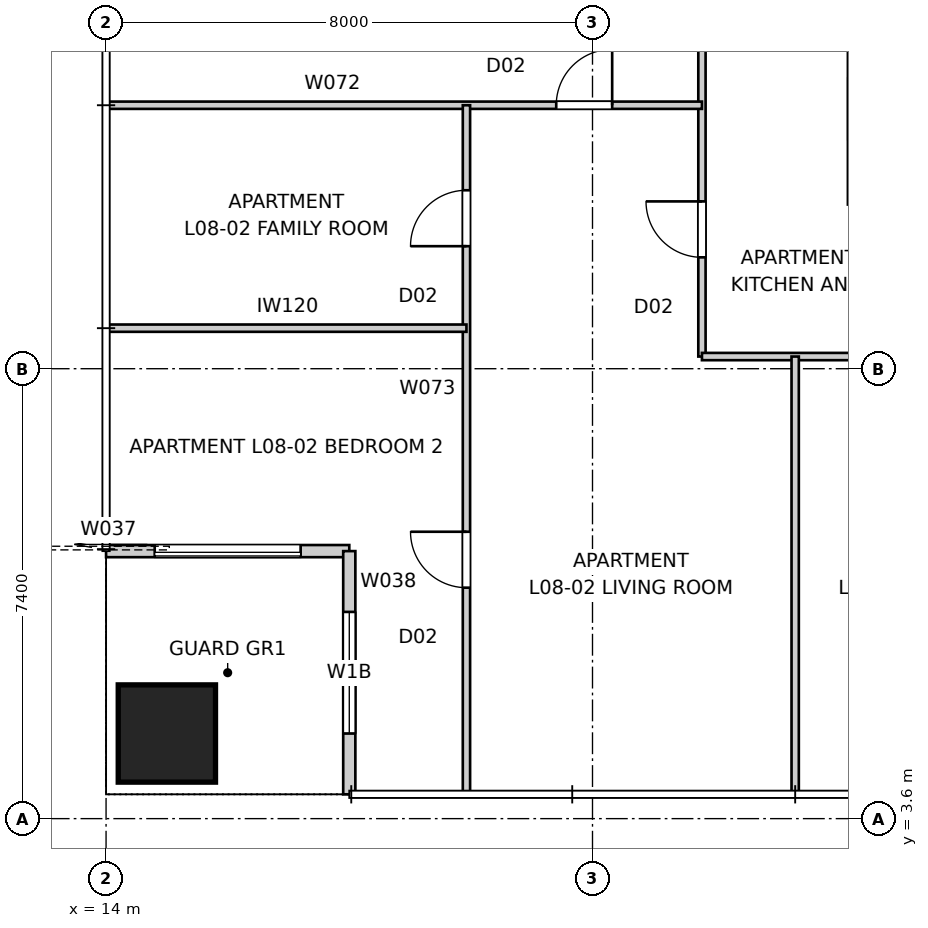
"""IFC4 building model, lengths in metres.
Left out: names, types, materials, properties, quantities, classifications, styles, units other than length and angle.
Written with IfcOpenShell. Run it as: python <this file> out.ifc"""

import sys

from ifc_helpers import new_model, si_unit, direction, frame, frame_2d, origin, origin_2d, place, context, subcontext, project, spatial, rectangle, extrude, element, fill, save


model = new_model("IFC4")
c1 = context("Model", 3, precision=1e-05, world=origin(), true_north=direction((0.0, 1.0)))
c2 = subcontext(c1, "Body", "Model", "MODEL_VIEW")
j1 = project(units=[si_unit("LENGTHUNIT", "METRE"), si_unit("PLANEANGLEUNIT", "RADIAN")], contexts=[c1])
p1 = place(None, origin())
s1 = spatial("IfcSite", under=j1, at=p1, CompositionType="ELEMENT")
p2 = place(p1, origin())
s2 = spatial("IfcBuilding", under=s1, at=p2, CompositionType="ELEMENT")
p3 = place(p2, frame((0.0, 0.0, 32.0)))
s3 = spatial("IfcBuildingStorey", under=s2, at=p3, CompositionType="ELEMENT", Elevation=32.0)
p4 = place(p3, frame((15.0, 5.0, 0.0), z_axis=(0.0, 0.0, 1.0), x_axis=(1.0, 0.0, 0.0)))
e1 = element("IfcColumn", 1, at=p4, inside=s3, PredefinedType="COLUMN", context=c2, shape_type="SweptSolid", body=[
    extrude(rectangle(XDim=1.6, YDim=1.6, at=origin_2d()), origin(), (0.0, 0.0, 1.0), 3.4),
])
p5 = place(p3, frame((14.0, 8.0, 0.0), z_axis=(0.0, 0.0, 1.0), x_axis=(1.0, 0.0, 0.0)))
e2 = element("IfcWall", 2, at=p5, inside=s3, PredefinedType="SOLIDWALL", context=c2, shape_type="SweptSolid", body=[
    extrude(rectangle(XDim=4.0, YDim=0.2, at=frame_2d((2.0, 0.0))), origin(), (0.0, 0.0, 1.0), 3.25),
])
p6 = place(p5, frame((0.8, 0.0, 0.0)))
e3 = element("IfcOpeningElement", 3, at=p6, cuts=e2, PredefinedType="OPENING", context=c2, shape_type="SweptSolid", body=[
    extrude(rectangle(XDim=2.4, YDim=2.1, at=frame_2d((1.2, 1.05))), frame((0.0, 0.11, 0.0), z_axis=(0.0, -1.0, 0.0), x_axis=(1.0, 0.0, 0.0)), (0.0, 0.0, 1.0), 0.22),
])
p7 = place(p3, frame((18.0, 8.0, 0.0), z_axis=(0.0, 0.0, 1.0), x_axis=(0.0, -1.0, 0.0)))
e4 = element("IfcWall", 4, at=p7, inside=s3, PredefinedType="SOLIDWALL", context=c2, shape_type="SweptSolid", body=[
    extrude(rectangle(XDim=4.0, YDim=0.2, at=frame_2d((2.0, 0.0))), origin(), (0.0, 0.0, 1.0), 3.25),
])
p8 = place(p7, frame((1.0, 0.0, 0.45)))
e5 = element("IfcOpeningElement", 5, at=p8, cuts=e4, PredefinedType="OPENING", context=c2, shape_type="SweptSolid", body=[
    extrude(rectangle(XDim=2.0, YDim=1.8, at=frame_2d((1.0, 0.9))), frame((0.0, 0.11, 0.0), z_axis=(0.0, -1.0, 0.0), x_axis=(1.0, 0.0, 0.0)), (0.0, 0.0, 1.0), 0.22),
])
p9 = place(p3, frame((26.3, 46.3, 0.0), z_axis=(0.0, 0.0, 1.0), x_axis=(0.0, -1.0, 0.0)))
e6 = element("IfcWall", 6, at=p9, inside=s3, PredefinedType="PARTITIONING", context=c2, shape_type="SweptSolid", body=[
    extrude(rectangle(XDim=32.6, YDim=0.2, at=frame_2d((16.3, 0.0))), origin(), (0.0, 0.0, 1.0), 3.25),
])
p10 = place(p9, frame((2.315, 0.0, 0.0)))
e7 = element("IfcOpeningElement", 7, at=p10, cuts=e6, PredefinedType="OPENING", context=c2, shape_type="SweptSolid", body=[
    extrude(rectangle(XDim=1.02, YDim=2.34, at=frame_2d((0.51, 1.17))), frame((0.0, 0.11, 0.0), z_axis=(0.0, -1.0, 0.0), x_axis=(1.0, 0.0, 0.0)), (0.0, 0.0, 1.0), 0.22),
])
p11 = place(p9, frame((10.624, 0.0, 0.0)))
e8 = element("IfcOpeningElement", 8, at=p11, cuts=e6, PredefinedType="OPENING", context=c2, shape_type="SweptSolid", body=[
    extrude(rectangle(XDim=1.02, YDim=2.34, at=frame_2d((0.51, 1.17))), frame((0.0, 0.11, 0.0), z_axis=(0.0, -1.0, 0.0), x_axis=(1.0, 0.0, 0.0)), (0.0, 0.0, 1.0), 0.22),
])
p12 = place(p9, frame((17.848, 0.0, 0.0)))
e9 = element("IfcOpeningElement", 9, at=p12, cuts=e6, PredefinedType="OPENING", context=c2, shape_type="SweptSolid", body=[
    extrude(rectangle(XDim=1.02, YDim=2.34, at=frame_2d((0.51, 1.17))), frame((0.0, 0.11, 0.0), z_axis=(0.0, -1.0, 0.0), x_axis=(1.0, 0.0, 0.0)), (0.0, 0.0, 1.0), 0.22),
])
p13 = place(p9, frame((30.516, 0.0, 0.0)))
e10 = element("IfcOpeningElement", 10, at=p13, cuts=e6, PredefinedType="OPENING", context=c2, shape_type="SweptSolid", body=[
    extrude(rectangle(XDim=1.02, YDim=2.34, at=frame_2d((0.51, 1.17))), frame((0.0, 0.11, 0.0), z_axis=(0.0, -1.0, 0.0), x_axis=(1.0, 0.0, 0.0)), (0.0, 0.0, 1.0), 0.22),
])
p14 = place(p3, frame((23.8, 11.2, 0.0), z_axis=(0.0, 0.0, 1.0), x_axis=(0.0, 1.0, 0.0)))
e11 = element("IfcWall", 11, at=p14, inside=s3, PredefinedType="PARTITIONING", context=c2, shape_type="SweptSolid", body=[
    extrude(rectangle(XDim=37.133, YDim=0.12, at=frame_2d((18.567, 0.0))), origin(), (0.0, 0.0, 1.0), 2.55),
])
p15 = place(p14, frame((33.007, 0.0, 0.0)))
e12 = element("IfcOpeningElement", 12, at=p15, cuts=e11, PredefinedType="OPENING", context=c2, shape_type="SweptSolid", body=[
    extrude(rectangle(XDim=0.92, YDim=2.34, at=frame_2d((0.46, 1.17))), frame((0.0, 0.07, 0.0), z_axis=(0.0, -1.0, 0.0), x_axis=(1.0, 0.0, 0.0)), (0.0, 0.0, 1.0), 0.14),
])
p16 = place(p14, frame((23.84, 0.0, 0.0)))
e13 = element("IfcOpeningElement", 13, at=p16, cuts=e11, PredefinedType="OPENING", context=c2, shape_type="SweptSolid", body=[
    extrude(rectangle(XDim=0.92, YDim=2.34, at=frame_2d((0.46, 1.17))), frame((0.0, 0.07, 0.0), z_axis=(0.0, -1.0, 0.0), x_axis=(1.0, 0.0, 0.0)), (0.0, 0.0, 1.0), 0.14),
])
p17 = place(p14, frame((16.482, 0.0, 0.0)))
e14 = element("IfcOpeningElement", 14, at=p17, cuts=e11, PredefinedType="OPENING", context=c2, shape_type="SweptSolid", body=[
    extrude(rectangle(XDim=0.92, YDim=2.34, at=frame_2d((0.46, 1.17))), frame((0.0, 0.07, 0.0), z_axis=(0.0, -1.0, 0.0), x_axis=(1.0, 0.0, 0.0)), (0.0, 0.0, 1.0), 0.14),
])
p18 = place(p14, frame((1.632, 0.0, 0.0)))
e15 = element("IfcOpeningElement", 15, at=p18, cuts=e11, PredefinedType="OPENING", context=c2, shape_type="SweptSolid", body=[
    extrude(rectangle(XDim=0.92, YDim=2.34, at=frame_2d((0.46, 1.17))), frame((0.0, 0.07, 0.0), z_axis=(0.0, -1.0, 0.0), x_axis=(1.0, 0.0, 0.0)), (0.0, 0.0, 1.0), 0.14),
])
p19 = place(p14, frame((19.704, 0.0, 0.0)))
e16 = element("IfcOpeningElement", 16, at=p19, cuts=e11, PredefinedType="OPENING", context=c2, shape_type="SweptSolid", body=[
    extrude(rectangle(XDim=0.96, YDim=2.1, at=frame_2d((0.48, 1.05))), frame((0.0, 0.07, 0.0), z_axis=(0.0, -1.0, 0.0), x_axis=(1.0, 0.0, 0.0)), (0.0, 0.0, 1.0), 0.14),
])
p20 = place(p14, frame((10.128, 0.0, 0.0)))
e17 = element("IfcOpeningElement", 17, at=p20, cuts=e11, PredefinedType="OPENING", context=c2, shape_type="SweptSolid", body=[
    extrude(rectangle(XDim=0.96, YDim=2.1, at=frame_2d((0.48, 1.05))), frame((0.0, 0.07, 0.0), z_axis=(0.0, -1.0, 0.0), x_axis=(1.0, 0.0, 0.0)), (0.0, 0.0, 1.0), 0.14),
])
p21 = place(p3, frame((54.667, 11.2, 0.0), z_axis=(0.0, 0.0, 1.0), x_axis=(-1.0, 0.0, 0.0)))
e18 = element("IfcWall", 18, at=p21, inside=s3, PredefinedType="PARTITIONING", context=c2, shape_type="SweptSolid", body=[
    extrude(rectangle(XDim=30.867, YDim=0.12, at=frame_2d((15.433, 0.0))), origin(), (0.0, 0.0, 1.0), 3.25),
])
p22 = place(p21, frame((23.348, 0.0, 0.0)))
e19 = element("IfcOpeningElement", 19, at=p22, cuts=e18, PredefinedType="OPENING", context=c2, shape_type="SweptSolid", body=[
    extrude(rectangle(XDim=0.92, YDim=2.34, at=frame_2d((0.46, 1.17))), frame((0.0, 0.07, 0.0), z_axis=(0.0, -1.0, 0.0), x_axis=(1.0, 0.0, 0.0)), (0.0, 0.0, 1.0), 0.14),
])
p23 = place(p21, frame((20.943, 0.0, 0.0)))
e20 = element("IfcOpeningElement", 20, at=p23, cuts=e18, PredefinedType="OPENING", context=c2, shape_type="SweptSolid", body=[
    extrude(rectangle(XDim=0.92, YDim=2.34, at=frame_2d((0.46, 1.17))), frame((0.0, 0.07, 0.0), z_axis=(0.0, -1.0, 0.0), x_axis=(1.0, 0.0, 0.0)), (0.0, 0.0, 1.0), 0.14),
])
p24 = place(p21, frame((5.065, 0.0, 0.0)))
e21 = element("IfcOpeningElement", 21, at=p24, cuts=e18, PredefinedType="OPENING", context=c2, shape_type="SweptSolid", body=[
    extrude(rectangle(XDim=0.92, YDim=2.34, at=frame_2d((0.46, 1.17))), frame((0.0, 0.07, 0.0), z_axis=(0.0, -1.0, 0.0), x_axis=(1.0, 0.0, 0.0)), (0.0, 0.0, 1.0), 0.14),
])
p25 = place(p21, frame((27.065, 0.0, 0.0)))
e22 = element("IfcOpeningElement", 22, at=p25, cuts=e18, PredefinedType="OPENING", context=c2, shape_type="SweptSolid", body=[
    extrude(rectangle(XDim=0.92, YDim=2.34, at=frame_2d((0.46, 1.17))), frame((0.0, 0.07, 0.0), z_axis=(0.0, -1.0, 0.0), x_axis=(1.0, 0.0, 0.0)), (0.0, 0.0, 1.0), 0.14),
])
p26 = place(p21, frame((1.353, 0.0, 0.0)))
e23 = element("IfcOpeningElement", 23, at=p26, cuts=e18, PredefinedType="OPENING", context=c2, shape_type="SweptSolid", body=[
    extrude(rectangle(XDim=0.96, YDim=2.1, at=frame_2d((0.48, 1.05))), frame((0.0, 0.07, 0.0), z_axis=(0.0, -1.0, 0.0), x_axis=(1.0, 0.0, 0.0)), (0.0, 0.0, 1.0), 0.14),
])
p27 = place(p21, frame((8.83, 0.0, 0.0)))
e24 = element("IfcOpeningElement", 24, at=p27, cuts=e18, PredefinedType="OPENING", context=c2, shape_type="SweptSolid", body=[
    extrude(rectangle(XDim=0.96, YDim=2.1, at=frame_2d((0.48, 1.05))), frame((0.0, 0.07, 0.0), z_axis=(0.0, -1.0, 0.0), x_axis=(1.0, 0.0, 0.0)), (0.0, 0.0, 1.0), 0.14),
])
p28 = place(p21, frame((12.328, 0.0, 0.0)))
e25 = element("IfcOpeningElement", 25, at=p28, cuts=e18, PredefinedType="OPENING", context=c2, shape_type="SweptSolid", body=[
    extrude(rectangle(XDim=0.96, YDim=2.1, at=frame_2d((0.48, 1.05))), frame((0.0, 0.07, 0.0), z_axis=(0.0, -1.0, 0.0), x_axis=(1.0, 0.0, 0.0)), (0.0, 0.0, 1.0), 0.14),
])
p29 = place(p21, frame((15.996, 0.0, 0.0)))
e26 = element("IfcOpeningElement", 26, at=p29, cuts=e18, PredefinedType="OPENING", context=c2, shape_type="SweptSolid", body=[
    extrude(rectangle(XDim=0.96, YDim=2.1, at=frame_2d((0.48, 1.05))), frame((0.0, 0.07, 0.0), z_axis=(0.0, -1.0, 0.0), x_axis=(1.0, 0.0, 0.0)), (0.0, 0.0, 1.0), 0.14),
])
p30 = place(p3, frame((14.04, 15.333, 0.0), z_axis=(0.0, 0.0, 1.0), x_axis=(1.0, 0.0, 0.0)))
e27 = element("IfcWall", 27, at=p30, inside=s3, PredefinedType="PARTITIONING", context=c2, shape_type="SweptSolid", body=[
    extrude(rectangle(XDim=9.76, YDim=0.12, at=frame_2d((4.88, 0.0))), origin(), (0.0, 0.0, 1.0), 2.638),
])
p31 = place(p30, frame((7.364, 0.0, 0.0)))
e28 = element("IfcOpeningElement", 28, at=p31, cuts=e27, PredefinedType="OPENING", context=c2, shape_type="SweptSolid", body=[
    extrude(rectangle(XDim=0.92, YDim=2.34, at=frame_2d((0.46, 1.17))), frame((0.0, 0.07, 0.0), z_axis=(0.0, -1.0, 0.0), x_axis=(1.0, 0.0, 0.0)), (0.0, 0.0, 1.0), 0.14),
])
p32 = place(p3, frame((19.927, 4.04, 0.0), z_axis=(0.0, 0.0, 1.0), x_axis=(0.0, 1.0, 0.0)))
e29 = element("IfcWall", 29, at=p32, inside=s3, PredefinedType="PARTITIONING", context=c2, shape_type="SweptSolid", body=[
    extrude(rectangle(XDim=11.293, YDim=0.12, at=frame_2d((5.646, 0.0))), origin(), (0.0, 0.0, 1.0), 3.25),
])
p33 = place(p32, frame((3.358, 0.0, 0.0)))
e30 = element("IfcOpeningElement", 30, at=p33, cuts=e29, PredefinedType="OPENING", context=c2, shape_type="SweptSolid", body=[
    extrude(rectangle(XDim=0.92, YDim=2.34, at=frame_2d((0.46, 1.17))), frame((0.0, 0.07, 0.0), z_axis=(0.0, -1.0, 0.0), x_axis=(1.0, 0.0, 0.0)), (0.0, 0.0, 1.0), 0.14),
])
p34 = place(p32, frame((8.975, 0.0, 0.0)))
e31 = element("IfcOpeningElement", 31, at=p34, cuts=e29, PredefinedType="OPENING", context=c2, shape_type="SweptSolid", body=[
    extrude(rectangle(XDim=0.92, YDim=2.34, at=frame_2d((0.46, 1.17))), frame((0.0, 0.07, 0.0), z_axis=(0.0, -1.0, 0.0), x_axis=(1.0, 0.0, 0.0)), (0.0, 0.0, 1.0), 0.14),
])
p35 = place(p3, frame((25.333, 11.2, 0.0), z_axis=(0.0, 0.0, 1.0), x_axis=(0.0, -1.0, 0.0)))
e32 = element("IfcWall", 32, at=p35, inside=s3, PredefinedType="PARTITIONING", context=c2, shape_type="SweptSolid", body=[
    extrude(rectangle(XDim=7.16, YDim=0.12, at=frame_2d((3.58, 0.0))), origin(), (0.0, 0.0, 1.0), 2.638),
])
p36 = place(p3, frame((14.04, 11.667, 0.0), z_axis=(0.0, 0.0, 1.0), x_axis=(1.0, 0.0, 0.0)))
e33 = element("IfcWall", 33, at=p36, inside=s3, PredefinedType="PARTITIONING", context=c2, shape_type="SweptSolid", body=[
    extrude(rectangle(XDim=5.887, YDim=0.12, at=frame_2d((2.943, 0.0))), origin(), (0.0, 0.0, 1.0), 3.25),
])
p37 = place(p6, origin())
e34 = element("IfcDoor", 34, at=p37, inside=s3, OperationType="SLIDING_TO_LEFT", PredefinedType="DOOR", context=c2, shape_type="SweptSolid", body=[
    extrude(rectangle(XDim=2.4, YDim=2.1, at=frame_2d((1.2, 1.05))), frame((0.0, 0.025, 0.0), z_axis=(0.0, -1.0, 0.0), x_axis=(1.0, 0.0, 0.0)), (0.0, 0.0, 1.0), 0.05),
])
fill(e3, e34)
p38 = place(p8, origin())
e35 = element("IfcWindow", 35, at=p38, inside=s3, PartitioningType="SINGLE_PANEL", PredefinedType="WINDOW", context=c2, shape_type="SweptSolid", body=[
    extrude(rectangle(XDim=2.0, YDim=1.8, at=frame_2d((1.0, 0.9))), frame((0.0, 0.03, 0.0), z_axis=(0.0, -1.0, 0.0), x_axis=(1.0, 0.0, 0.0)), (0.0, 0.0, 1.0), 0.06),
])
fill(e5, e35)
p39 = place(p18, origin())
e36 = element("IfcDoor", 36, at=p39, inside=s3, OperationType="SINGLE_SWING_RIGHT", PredefinedType="DOOR", context=c2, shape_type="SweptSolid", body=[
    extrude(rectangle(XDim=0.92, YDim=2.34, at=frame_2d((0.46, 1.17))), frame((0.0, 0.025, 0.0), z_axis=(0.0, -1.0, 0.0), x_axis=(1.0, 0.0, 0.0)), (0.0, 0.0, 1.0), 0.05),
])
fill(e15, e36)
p40 = place(p33, origin())
e37 = element("IfcDoor", 37, at=p40, inside=s3, OperationType="SINGLE_SWING_RIGHT", PredefinedType="DOOR", context=c2, shape_type="SweptSolid", body=[
    extrude(rectangle(XDim=0.92, YDim=2.34, at=frame_2d((0.46, 1.17))), frame((0.0, 0.025, 0.0), z_axis=(0.0, -1.0, 0.0), x_axis=(1.0, 0.0, 0.0)), (0.0, 0.0, 1.0), 0.05),
])
fill(e30, e37)
p41 = place(p31, origin())
e38 = element("IfcDoor", 38, at=p41, inside=s3, OperationType="SINGLE_SWING_RIGHT", PredefinedType="DOOR", context=c2, shape_type="SweptSolid", body=[
    extrude(rectangle(XDim=0.92, YDim=2.34, at=frame_2d((0.46, 1.17))), frame((0.0, 0.025, 0.0), z_axis=(0.0, -1.0, 0.0), x_axis=(1.0, 0.0, 0.0)), (0.0, 0.0, 1.0), 0.05),
])
fill(e28, e38)
p42 = place(p34, origin())
e39 = element("IfcDoor", 39, at=p42, inside=s3, OperationType="SINGLE_SWING_LEFT", PredefinedType="DOOR", context=c2, shape_type="SweptSolid", body=[
    extrude(rectangle(XDim=0.92, YDim=2.34, at=frame_2d((0.46, 1.17))), frame((0.0, 0.025, 0.0), z_axis=(0.0, -1.0, 0.0), x_axis=(1.0, 0.0, 0.0)), (0.0, 0.0, 1.0), 0.05),
])
fill(e31, e39)
save(model, sys.argv[1])
